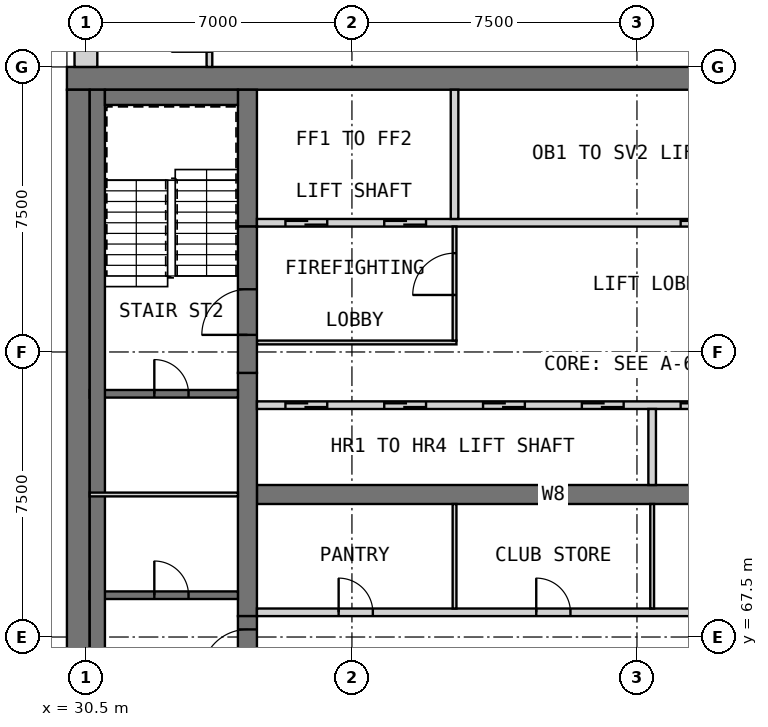
"""IFC4 building model, lengths in metres.
Left out: names, types, materials, properties, quantities, classifications, styles, units other than length and angle.
Written with IfcOpenShell. Run it as: python <this file> out.ifc"""

import sys

from ifc_helpers import new_model, si_unit, direction, frame, frame_2d, origin, place, context, subcontext, project, spatial, rectangle, extrude, element, fill, save


model = new_model("IFC4")
c1 = context("Model", 3, precision=1e-05, world=origin(), true_north=direction((0.0, 1.0)))
c2 = subcontext(c1, "Body", "Model", "MODEL_VIEW")
j1 = project(units=[si_unit("LENGTHUNIT", "METRE"), si_unit("PLANEANGLEUNIT", "RADIAN")], contexts=[c1])
p1 = place(None, origin())
s1 = spatial("IfcSite", under=j1, at=p1, CompositionType="ELEMENT")
p2 = place(p1, origin())
s2 = spatial("IfcBuilding", under=s1, at=p2, CompositionType="ELEMENT")
p3 = place(p2, frame((0.0, 0.0, 273.2)))
s3 = spatial("IfcBuildingStorey", under=s2, at=p3, CompositionType="ELEMENT", Elevation=273.2)
p4 = place(p3, frame((30.0, 82.2, 0.0), z_axis=(0.0, 0.0, 1.0), x_axis=(1.0, 0.0, 0.0)))
e1 = element("IfcWall", 1, at=p4, inside=s3, PredefinedType="SHEAR", context=c2, shape_type="SweptSolid", body=[
    extrude(rectangle(XDim=30.0, YDim=0.6, at=frame_2d((15.0, 0.0))), origin(), (0.0, 0.0, 1.0), 3.5),
])
p5 = place(p3, frame((30.3, 60.6, 0.0), z_axis=(0.0, 0.0, 1.0), x_axis=(0.0, 1.0, 0.0)))
e2 = element("IfcWall", 2, at=p5, inside=s3, PredefinedType="SHEAR", context=c2, shape_type="SweptSolid", body=[
    extrude(rectangle(XDim=21.3, YDim=0.6, at=frame_2d((10.65, 0.0))), origin(), (0.0, 0.0, 1.0), 3.5),
])
p6 = place(p3, frame((35.0, 71.25, 0.0), z_axis=(0.0, 0.0, 1.0), x_axis=(1.0, 0.0, 0.0)))
e3 = element("IfcWall", 3, at=p6, inside=s3, PredefinedType="SHEAR", context=c2, shape_type="SweptSolid", body=[
    extrude(rectangle(XDim=15.6, YDim=0.5, at=frame_2d((7.8, 0.0))), origin(), (0.0, 0.0, 1.0), 3.5),
])
p7 = place(p3, frame((34.75, 68.05, 0.0), z_axis=(0.0, 0.0, 1.0), x_axis=(0.0, 1.0, 0.0)))
e4 = element("IfcWall", 4, at=p7, inside=s3, PredefinedType="SHEAR", context=c2, shape_type="SweptSolid", body=[
    extrude(rectangle(XDim=6.4, YDim=0.5, at=frame_2d((3.2, 0.0))), origin(), (0.0, 0.0, 1.0), 3.5),
])
p8 = place(p3, frame((34.75, 78.3, 0.0), z_axis=(0.0, 0.0, 1.0), x_axis=(0.0, 1.0, 0.0)))
e5 = element("IfcWall", 5, at=p8, inside=s3, PredefinedType="SHEAR", context=c2, shape_type="SweptSolid", body=[
    extrude(rectangle(XDim=3.6, YDim=0.5, at=frame_2d((1.8, 0.0))), origin(), (0.0, 0.0, 1.0), 3.5),
])
p9 = place(p2, frame((0.0, 0.0, 34.0)))
s4 = spatial("IfcBuildingStorey", under=s2, at=p9, CompositionType="ELEMENT", Elevation=34.0)
for number, where, z_axis, x_axis in (
    (6, (29.7, 70.8, 0.0), (0.0, 0.0, 1.0), (0.0, 1.0, 0.0)),
    (7, (29.7, 75.675, 0.0), (0.0, 0.0, 1.0), (0.0, 1.0, 0.0)),
    (8, (29.7, 80.55, 0.0), (0.0, 0.0, 1.0), (0.0, 1.0, 0.0)),
):
    element("IfcWall", number, at=place(p9, frame(where, z_axis=z_axis, x_axis=x_axis)), inside=s4, PredefinedType="SOLIDWALL", context=c2, shape_type="SweptSolid", body=[
        extrude(rectangle(XDim=0.9, YDim=0.6, at=frame_2d((0.45, 0.0))), origin(), (0.0, 0.0, 1.0), 286.2),
    ])
p10 = place(p3, frame((30.5, 89.5, 0.0), z_axis=(0.0, 0.0, 1.0), x_axis=(0.0, -1.0, 0.0)))
e9 = element("IfcWall", 9, at=p10, inside=s3, PredefinedType="SOLIDWALL", context=c2, shape_type="SweptSolid", body=[
    extrude(rectangle(XDim=7.0, YDim=0.6, at=frame_2d((3.5, 0.0))), origin(), (0.0, 0.0, 1.0), 3.25),
])
p11 = place(p10, frame((3.925, 0.0, 0.8)))
e10 = element("IfcOpeningElement", 10, at=p11, cuts=e9, PredefinedType="OPENING", context=c2, shape_type="SweptSolid", body=[
    extrude(rectangle(XDim=2.4, YDim=1.8, at=frame_2d((1.2, 0.9))), frame((0.0, 0.31, 0.0), z_axis=(0.0, -1.0, 0.0), x_axis=(1.0, 0.0, 0.0)), (0.0, 0.0, 1.0), 0.62),
])
p12 = place(p10, frame((0.425, 0.0, 0.8)))
e11 = element("IfcOpeningElement", 11, at=p12, cuts=e9, PredefinedType="OPENING", context=c2, shape_type="SweptSolid", body=[
    extrude(rectangle(XDim=2.4, YDim=1.8, at=frame_2d((1.2, 0.9))), frame((0.0, 0.31, 0.0), z_axis=(0.0, -1.0, 0.0), x_axis=(1.0, 0.0, 0.0)), (0.0, 0.0, 1.0), 0.62),
])
p13 = place(p3, frame((35.0, 68.15, 0.0), z_axis=(0.0, 0.0, 1.0), x_axis=(1.0, 0.0, 0.0)))
e12 = element("IfcWall", 12, at=p13, inside=s3, PredefinedType="PARTITIONING", context=c2, shape_type="SweptSolid", body=[
    extrude(rectangle(XDim=15.6, YDim=0.2, at=frame_2d((7.8, 0.0))), origin(), (0.0, 0.0, 1.0), 3.25),
])
p14 = place(p13, frame((2.15, 0.0, 0.0)))
e13 = element("IfcOpeningElement", 13, at=p14, cuts=e12, PredefinedType="OPENING", context=c2, shape_type="SweptSolid", body=[
    extrude(rectangle(XDim=0.9, YDim=2.1, at=frame_2d((0.45, 1.05))), frame((0.0, 0.11, 0.0), z_axis=(0.0, -1.0, 0.0), x_axis=(1.0, 0.0, 0.0)), (0.0, 0.0, 1.0), 0.22),
])
p15 = place(p13, frame((7.35, 0.0, 0.0)))
e14 = element("IfcOpeningElement", 14, at=p15, cuts=e12, PredefinedType="OPENING", context=c2, shape_type="SweptSolid", body=[
    extrude(rectangle(XDim=0.9, YDim=2.1, at=frame_2d((0.45, 1.05))), frame((0.0, 0.11, 0.0), z_axis=(0.0, -1.0, 0.0), x_axis=(1.0, 0.0, 0.0)), (0.0, 0.0, 1.0), 0.22),
])
p16 = place(p13, frame((12.55, 0.0, 0.0)))
e15 = element("IfcOpeningElement", 15, at=p16, cuts=e12, PredefinedType="OPENING", context=c2, shape_type="SweptSolid", body=[
    extrude(rectangle(XDim=0.9, YDim=2.1, at=frame_2d((0.45, 1.05))), frame((0.0, 0.11, 0.0), z_axis=(0.0, -1.0, 0.0), x_axis=(1.0, 0.0, 0.0)), (0.0, 0.0, 1.0), 0.22),
])
for number, where, z_axis, x_axis in (
    (16, (40.2, 68.25, 0.0), (0.0, 0.0, 1.0), (0.0, 1.0, 0.0)),
    (17, (45.4, 68.25, 0.0), (0.0, 0.0, 1.0), (0.0, 1.0, 0.0)),
):
    element("IfcWall", number, at=place(p3, frame(where, z_axis=z_axis, x_axis=x_axis)), inside=s3, PredefinedType="PARTITIONING", context=c2, shape_type="SweptSolid", body=[
        extrude(rectangle(XDim=2.75, YDim=0.1, at=frame_2d((1.375, 0.0))), origin(), (0.0, 0.0, 1.0), 3.25),
    ])
p17 = place(p3, frame((35.0, 73.6, 0.0), z_axis=(0.0, 0.0, 1.0), x_axis=(1.0, 0.0, 0.0)))
e18 = element("IfcWall", 18, at=p17, inside=s3, PredefinedType="SOLIDWALL", context=c2, shape_type="SweptSolid", body=[
    extrude(rectangle(XDim=15.6, YDim=0.2, at=frame_2d((7.8, 0.0))), origin(), (0.0, 0.0, 1.0), 3.5),
])
p18 = place(p17, frame((0.75, 0.0, 0.0)))
e19 = element("IfcOpeningElement", 19, at=p18, cuts=e18, PredefinedType="OPENING", context=c2, shape_type="SweptSolid", body=[
    extrude(rectangle(XDim=1.1, YDim=2.1, at=frame_2d((0.55, 1.05))), frame((0.0, 0.11, 0.0), z_axis=(0.0, -1.0, 0.0), x_axis=(1.0, 0.0, 0.0)), (0.0, 0.0, 1.0), 0.22),
])
p19 = place(p17, frame((3.35, 0.0, 0.0)))
e20 = element("IfcOpeningElement", 20, at=p19, cuts=e18, PredefinedType="OPENING", context=c2, shape_type="SweptSolid", body=[
    extrude(rectangle(XDim=1.1, YDim=2.1, at=frame_2d((0.55, 1.05))), frame((0.0, 0.11, 0.0), z_axis=(0.0, -1.0, 0.0), x_axis=(1.0, 0.0, 0.0)), (0.0, 0.0, 1.0), 0.22),
])
p20 = place(p17, frame((5.95, 0.0, 0.0)))
e21 = element("IfcOpeningElement", 21, at=p20, cuts=e18, PredefinedType="OPENING", context=c2, shape_type="SweptSolid", body=[
    extrude(rectangle(XDim=1.1, YDim=2.1, at=frame_2d((0.55, 1.05))), frame((0.0, 0.11, 0.0), z_axis=(0.0, -1.0, 0.0), x_axis=(1.0, 0.0, 0.0)), (0.0, 0.0, 1.0), 0.22),
])
p21 = place(p17, frame((8.55, 0.0, 0.0)))
e22 = element("IfcOpeningElement", 22, at=p21, cuts=e18, PredefinedType="OPENING", context=c2, shape_type="SweptSolid", body=[
    extrude(rectangle(XDim=1.1, YDim=2.1, at=frame_2d((0.55, 1.05))), frame((0.0, 0.11, 0.0), z_axis=(0.0, -1.0, 0.0), x_axis=(1.0, 0.0, 0.0)), (0.0, 0.0, 1.0), 0.22),
])
p22 = place(p17, frame((11.15, 0.0, 0.0)))
e23 = element("IfcOpeningElement", 23, at=p22, cuts=e18, PredefinedType="OPENING", context=c2, shape_type="SweptSolid", body=[
    extrude(rectangle(XDim=1.1, YDim=2.1, at=frame_2d((0.55, 1.05))), frame((0.0, 0.11, 0.0), z_axis=(0.0, -1.0, 0.0), x_axis=(1.0, 0.0, 0.0)), (0.0, 0.0, 1.0), 0.22),
])
p23 = place(p17, frame((13.75, 0.0, 0.0)))
e24 = element("IfcOpeningElement", 24, at=p23, cuts=e18, PredefinedType="OPENING", context=c2, shape_type="SweptSolid", body=[
    extrude(rectangle(XDim=1.1, YDim=2.1, at=frame_2d((0.55, 1.05))), frame((0.0, 0.11, 0.0), z_axis=(0.0, -1.0, 0.0), x_axis=(1.0, 0.0, 0.0)), (0.0, 0.0, 1.0), 0.22),
])
p24 = place(p3, frame((45.4, 71.5, 0.0), z_axis=(0.0, 0.0, 1.0), x_axis=(0.0, 1.0, 0.0)))
e25 = element("IfcWall", 25, at=p24, inside=s3, PredefinedType="SOLIDWALL", context=c2, shape_type="SweptSolid", body=[
    extrude(rectangle(XDim=2.0, YDim=0.2, at=frame_2d((1.0, 0.0))), origin(), (0.0, 0.0, 1.0), 3.5),
])
p25 = place(p3, frame((35.0, 78.4, 0.0), z_axis=(0.0, 0.0, 1.0), x_axis=(1.0, 0.0, 0.0)))
e26 = element("IfcWall", 26, at=p25, inside=s3, PredefinedType="SOLIDWALL", context=c2, shape_type="SweptSolid", body=[
    extrude(rectangle(XDim=15.6, YDim=0.2, at=frame_2d((7.8, 0.0))), origin(), (0.0, 0.0, 1.0), 3.5),
])
p26 = place(p25, frame((0.75, 0.0, 0.0)))
e27 = element("IfcOpeningElement", 27, at=p26, cuts=e26, PredefinedType="OPENING", context=c2, shape_type="SweptSolid", body=[
    extrude(rectangle(XDim=1.1, YDim=2.1, at=frame_2d((0.55, 1.05))), frame((0.0, 0.11, 0.0), z_axis=(0.0, -1.0, 0.0), x_axis=(1.0, 0.0, 0.0)), (0.0, 0.0, 1.0), 0.22),
])
p27 = place(p25, frame((3.35, 0.0, 0.0)))
e28 = element("IfcOpeningElement", 28, at=p27, cuts=e26, PredefinedType="OPENING", context=c2, shape_type="SweptSolid", body=[
    extrude(rectangle(XDim=1.1, YDim=2.1, at=frame_2d((0.55, 1.05))), frame((0.0, 0.11, 0.0), z_axis=(0.0, -1.0, 0.0), x_axis=(1.0, 0.0, 0.0)), (0.0, 0.0, 1.0), 0.22),
])
p28 = place(p25, frame((11.15, 0.0, 0.0)))
e29 = element("IfcOpeningElement", 29, at=p28, cuts=e26, PredefinedType="OPENING", context=c2, shape_type="SweptSolid", body=[
    extrude(rectangle(XDim=1.1, YDim=2.1, at=frame_2d((0.55, 1.05))), frame((0.0, 0.11, 0.0), z_axis=(0.0, -1.0, 0.0), x_axis=(1.0, 0.0, 0.0)), (0.0, 0.0, 1.0), 0.22),
])
p29 = place(p25, frame((13.75, 0.0, 0.0)))
e30 = element("IfcOpeningElement", 30, at=p29, cuts=e26, PredefinedType="OPENING", context=c2, shape_type="SweptSolid", body=[
    extrude(rectangle(XDim=1.1, YDim=2.1, at=frame_2d((0.55, 1.05))), frame((0.0, 0.11, 0.0), z_axis=(0.0, -1.0, 0.0), x_axis=(1.0, 0.0, 0.0)), (0.0, 0.0, 1.0), 0.22),
])
p30 = place(p3, frame((40.2, 78.5, 0.0), z_axis=(0.0, 0.0, 1.0), x_axis=(0.0, 1.0, 0.0)))
e31 = element("IfcWall", 31, at=p30, inside=s3, PredefinedType="SOLIDWALL", context=c2, shape_type="SweptSolid", body=[
    extrude(rectangle(XDim=3.4, YDim=0.2, at=frame_2d((1.7, 0.0))), origin(), (0.0, 0.0, 1.0), 3.5),
])
p31 = place(p3, frame((35.0, 75.25, 0.0), z_axis=(0.0, 0.0, 1.0), x_axis=(1.0, 0.0, 0.0)))
e32 = element("IfcWall", 32, at=p31, inside=s3, PredefinedType="PARTITIONING", context=c2, shape_type="SweptSolid", body=[
    extrude(rectangle(XDim=5.25, YDim=0.1, at=frame_2d((2.625, 0.0))), origin(), (0.0, 0.0, 1.0), 3.25),
])
p32 = place(p3, frame((40.2, 75.3, 0.0), z_axis=(0.0, 0.0, 1.0), x_axis=(0.0, 1.0, 0.0)))
e33 = element("IfcWall", 33, at=p32, inside=s3, PredefinedType="PARTITIONING", context=c2, shape_type="SweptSolid", body=[
    extrude(rectangle(XDim=3.0, YDim=0.1, at=frame_2d((1.5, 0.0))), origin(), (0.0, 0.0, 1.0), 3.25),
])
p33 = place(p32, frame((1.2, 0.0, 0.0)))
e34 = element("IfcOpeningElement", 34, at=p33, cuts=e33, PredefinedType="OPENING", context=c2, shape_type="SweptSolid", body=[
    extrude(rectangle(XDim=1.1, YDim=2.1, at=frame_2d((0.55, 1.05))), frame((0.0, 0.06, 0.0), z_axis=(0.0, -1.0, 0.0), x_axis=(1.0, 0.0, 0.0)), (0.0, 0.0, 1.0), 0.12),
])
p34 = place(p3, frame((34.75, 64.2, 0.0), z_axis=(0.0, 0.0, 1.0), x_axis=(0.0, 1.0, 0.0)))
e35 = element("IfcWall", 35, at=p34, inside=s3, PredefinedType="SOLIDWALL", context=c2, shape_type="SweptSolid", body=[
    extrude(rectangle(XDim=3.85, YDim=0.5, at=frame_2d((1.925, 0.0))), origin(), (0.0, 0.0, 1.0), 2.3),
])
p35 = place(p34, frame((2.3, 0.0, 0.0)))
e36 = element("IfcOpeningElement", 36, at=p35, cuts=e35, PredefinedType="OPENING", context=c2, shape_type="SweptSolid", body=[
    extrude(rectangle(XDim=1.2, YDim=2.1, at=frame_2d((0.6, 1.05))), frame((0.0, 0.26, 0.0), z_axis=(0.0, -1.0, 0.0), x_axis=(1.0, 0.0, 0.0)), (0.0, 0.0, 1.0), 0.52),
])
p36 = place(p3, frame((34.75, 74.45, 0.0), z_axis=(0.0, 0.0, 1.0), x_axis=(0.0, 1.0, 0.0)))
e37 = element("IfcWall", 37, at=p36, inside=s3, PredefinedType="SOLIDWALL", context=c2, shape_type="SweptSolid", body=[
    extrude(rectangle(XDim=3.85, YDim=0.5, at=frame_2d((1.925, 0.0))), origin(), (0.0, 0.0, 1.0), 2.3),
])
p37 = place(p36, frame((1.0, 0.0, 0.0)))
e38 = element("IfcOpeningElement", 38, at=p37, cuts=e37, PredefinedType="OPENING", context=c2, shape_type="SweptSolid", body=[
    extrude(rectangle(XDim=1.2, YDim=2.1, at=frame_2d((0.6, 1.05))), frame((0.0, 0.26, 0.0), z_axis=(0.0, -1.0, 0.0), x_axis=(1.0, 0.0, 0.0)), (0.0, 0.0, 1.0), 0.52),
])
p38 = place(p3, frame((30.6, 68.6, 0.0), z_axis=(0.0, 0.0, 1.0), x_axis=(1.0, 0.0, 0.0)))
e39 = element("IfcWall", 39, at=p38, inside=s3, PredefinedType="SOLIDWALL", context=c2, shape_type="SweptSolid", body=[
    extrude(rectangle(XDim=3.9, YDim=0.2, at=frame_2d((1.95, 0.0))), origin(), (0.0, 0.0, 1.0), 3.25),
])
p39 = place(p38, frame((1.7, 0.0, 0.0)))
e40 = element("IfcOpeningElement", 40, at=p39, cuts=e39, PredefinedType="OPENING", context=c2, shape_type="SweptSolid", body=[
    extrude(rectangle(XDim=0.9, YDim=2.1, at=frame_2d((0.45, 1.05))), frame((0.0, 0.11, 0.0), z_axis=(0.0, -1.0, 0.0), x_axis=(1.0, 0.0, 0.0)), (0.0, 0.0, 1.0), 0.22),
])
p40 = place(p3, frame((30.6, 73.9, 0.0), z_axis=(0.0, 0.0, 1.0), x_axis=(1.0, 0.0, 0.0)))
e41 = element("IfcWall", 41, at=p40, inside=s3, PredefinedType="SOLIDWALL", context=c2, shape_type="SweptSolid", body=[
    extrude(rectangle(XDim=3.9, YDim=0.2, at=frame_2d((1.95, 0.0))), origin(), (0.0, 0.0, 1.0), 3.25),
])
p41 = place(p40, frame((1.7, 0.0, 0.0)))
e42 = element("IfcOpeningElement", 42, at=p41, cuts=e41, PredefinedType="OPENING", context=c2, shape_type="SweptSolid", body=[
    extrude(rectangle(XDim=0.9, YDim=2.1, at=frame_2d((0.45, 1.05))), frame((0.0, 0.11, 0.0), z_axis=(0.0, -1.0, 0.0), x_axis=(1.0, 0.0, 0.0)), (0.0, 0.0, 1.0), 0.22),
])
p42 = place(p3, frame((30.8, 60.6, 0.0), z_axis=(0.0, 0.0, 1.0), x_axis=(0.0, 1.0, 0.0)))
e43 = element("IfcWall", 43, at=p42, inside=s3, PredefinedType="SOLIDWALL", context=c2, shape_type="SweptSolid", body=[
    extrude(rectangle(XDim=21.3, YDim=0.4, at=frame_2d((10.65, 0.0))), origin(), (0.0, 0.0, 1.0), 3.25),
])
p43 = place(p3, frame((31.0, 81.7, 0.0), z_axis=(0.0, 0.0, 1.0), x_axis=(1.0, 0.0, 0.0)))
e44 = element("IfcWall", 44, at=p43, inside=s3, PredefinedType="SOLIDWALL", context=c2, shape_type="SweptSolid", body=[
    extrude(rectangle(XDim=3.5, YDim=0.4, at=frame_2d((1.75, 0.0))), origin(), (0.0, 0.0, 1.0), 3.25),
])
p44 = place(p3, frame((30.6, 71.25, 0.0), z_axis=(0.0, 0.0, 1.0), x_axis=(1.0, 0.0, 0.0)))
e45 = element("IfcWall", 45, at=p44, inside=s3, PredefinedType="PARTITIONING", context=c2, shape_type="SweptSolid", body=[
    extrude(rectangle(XDim=3.9, YDim=0.1, at=frame_2d((1.95, 0.0))), origin(), (0.0, 0.0, 1.0), 3.25),
])
p45 = place(p3, frame((33.75, 82.5, 0.0), z_axis=(0.0, 0.0, 1.0), x_axis=(0.0, 1.0, 0.0)))
e46 = element("IfcWall", 46, at=p45, inside=s3, PredefinedType="PARTITIONING", context=c2, shape_type="SweptSolid", body=[
    extrude(rectangle(XDim=1.725, YDim=0.15, at=frame_2d((0.863, 0.0))), origin(), (0.0, 0.0, 1.0), 3.25),
])
p46 = place(p45, frame((0.4, 0.0, 0.0)))
e47 = element("IfcOpeningElement", 47, at=p46, cuts=e46, PredefinedType="OPENING", context=c2, shape_type="SweptSolid", body=[
    extrude(rectangle(XDim=1.0, YDim=2.1, at=frame_2d((0.5, 1.05))), frame((0.0, 0.085, 0.0), z_axis=(0.0, -1.0, 0.0), x_axis=(1.0, 0.0, 0.0)), (0.0, 0.0, 1.0), 0.17),
])
p47 = place(p14, origin())
e48 = element("IfcDoor", 48, at=p47, inside=s3, OperationType="SINGLE_SWING_RIGHT", PredefinedType="DOOR", context=c2, shape_type="SweptSolid", body=[
    extrude(rectangle(XDim=0.9, YDim=2.1, at=frame_2d((0.45, 1.05))), frame((0.0, 0.025, 0.0), z_axis=(0.0, -1.0, 0.0), x_axis=(1.0, 0.0, 0.0)), (0.0, 0.0, 1.0), 0.05),
])
fill(e13, e48)
p48 = place(p15, origin())
e49 = element("IfcDoor", 49, at=p48, inside=s3, OperationType="SINGLE_SWING_LEFT", PredefinedType="DOOR", context=c2, shape_type="SweptSolid", body=[
    extrude(rectangle(XDim=0.9, YDim=2.1, at=frame_2d((0.45, 1.05))), frame((0.0, 0.025, 0.0), z_axis=(0.0, -1.0, 0.0), x_axis=(1.0, 0.0, 0.0)), (0.0, 0.0, 1.0), 0.05),
])
fill(e14, e49)
p49 = place(p18, origin())
e50 = element("IfcDoor", 50, at=p49, inside=s3, OperationType="DOUBLE_DOOR_SLIDING", PredefinedType="DOOR", context=c2, shape_type="SweptSolid", body=[
    extrude(rectangle(XDim=1.1, YDim=2.1, at=frame_2d((0.55, 1.05))), frame((0.0, 0.025, 0.0), z_axis=(0.0, -1.0, 0.0), x_axis=(1.0, 0.0, 0.0)), (0.0, 0.0, 1.0), 0.05),
])
fill(e19, e50)
p50 = place(p19, origin())
e51 = element("IfcDoor", 51, at=p50, inside=s3, OperationType="DOUBLE_DOOR_SLIDING", PredefinedType="DOOR", context=c2, shape_type="SweptSolid", body=[
    extrude(rectangle(XDim=1.1, YDim=2.1, at=frame_2d((0.55, 1.05))), frame((0.0, 0.025, 0.0), z_axis=(0.0, -1.0, 0.0), x_axis=(1.0, 0.0, 0.0)), (0.0, 0.0, 1.0), 0.05),
])
fill(e20, e51)
p51 = place(p20, origin())
e52 = element("IfcDoor", 52, at=p51, inside=s3, OperationType="DOUBLE_DOOR_SLIDING", PredefinedType="DOOR", context=c2, shape_type="SweptSolid", body=[
    extrude(rectangle(XDim=1.1, YDim=2.1, at=frame_2d((0.55, 1.05))), frame((0.0, 0.025, 0.0), z_axis=(0.0, -1.0, 0.0), x_axis=(1.0, 0.0, 0.0)), (0.0, 0.0, 1.0), 0.05),
])
fill(e21, e52)
p52 = place(p21, origin())
e53 = element("IfcDoor", 53, at=p52, inside=s3, OperationType="DOUBLE_DOOR_SLIDING", PredefinedType="DOOR", context=c2, shape_type="SweptSolid", body=[
    extrude(rectangle(XDim=1.1, YDim=2.1, at=frame_2d((0.55, 1.05))), frame((0.0, 0.025, 0.0), z_axis=(0.0, -1.0, 0.0), x_axis=(1.0, 0.0, 0.0)), (0.0, 0.0, 1.0), 0.05),
])
fill(e22, e53)
p53 = place(p22, origin())
e54 = element("IfcDoor", 54, at=p53, inside=s3, OperationType="DOUBLE_DOOR_SLIDING", PredefinedType="DOOR", context=c2, shape_type="SweptSolid", body=[
    extrude(rectangle(XDim=1.1, YDim=2.1, at=frame_2d((0.55, 1.05))), frame((0.0, 0.025, 0.0), z_axis=(0.0, -1.0, 0.0), x_axis=(1.0, 0.0, 0.0)), (0.0, 0.0, 1.0), 0.05),
])
fill(e23, e54)
p54 = place(p26, origin())
e55 = element("IfcDoor", 55, at=p54, inside=s3, OperationType="DOUBLE_DOOR_SLIDING", PredefinedType="DOOR", context=c2, shape_type="SweptSolid", body=[
    extrude(rectangle(XDim=1.1, YDim=2.1, at=frame_2d((0.55, 1.05))), frame((0.0, 0.025, 0.0), z_axis=(0.0, -1.0, 0.0), x_axis=(1.0, 0.0, 0.0)), (0.0, 0.0, 1.0), 0.05),
])
fill(e27, e55)
p55 = place(p27, origin())
e56 = element("IfcDoor", 56, at=p55, inside=s3, OperationType="DOUBLE_DOOR_SLIDING", PredefinedType="DOOR", context=c2, shape_type="SweptSolid", body=[
    extrude(rectangle(XDim=1.1, YDim=2.1, at=frame_2d((0.55, 1.05))), frame((0.0, 0.025, 0.0), z_axis=(0.0, -1.0, 0.0), x_axis=(1.0, 0.0, 0.0)), (0.0, 0.0, 1.0), 0.05),
])
fill(e28, e56)
p56 = place(p28, origin())
e57 = element("IfcDoor", 57, at=p56, inside=s3, OperationType="DOUBLE_DOOR_SLIDING", PredefinedType="DOOR", context=c2, shape_type="SweptSolid", body=[
    extrude(rectangle(XDim=1.1, YDim=2.1, at=frame_2d((0.55, 1.05))), frame((0.0, 0.025, 0.0), z_axis=(0.0, -1.0, 0.0), x_axis=(1.0, 0.0, 0.0)), (0.0, 0.0, 1.0), 0.05),
])
fill(e29, e57)
p57 = place(p33, origin())
e58 = element("IfcDoor", 58, at=p57, inside=s3, OperationType="SINGLE_SWING_LEFT", PredefinedType="DOOR", context=c2, shape_type="SweptSolid", body=[
    extrude(rectangle(XDim=1.1, YDim=2.1, at=frame_2d((0.55, 1.05))), frame((0.0, 0.025, 0.0), z_axis=(0.0, -1.0, 0.0), x_axis=(1.0, 0.0, 0.0)), (0.0, 0.0, 1.0), 0.05),
])
fill(e34, e58)
p58 = place(p35, origin())
e59 = element("IfcDoor", 59, at=p58, inside=s3, OperationType="SINGLE_SWING_LEFT", PredefinedType="DOOR", context=c2, shape_type="SweptSolid", body=[
    extrude(rectangle(XDim=1.2, YDim=2.1, at=frame_2d((0.6, 1.05))), frame((0.0, 0.025, 0.0), z_axis=(0.0, -1.0, 0.0), x_axis=(1.0, 0.0, 0.0)), (0.0, 0.0, 1.0), 0.05),
])
fill(e36, e59)
p59 = place(p37, origin())
e60 = element("IfcDoor", 60, at=p59, inside=s3, OperationType="SINGLE_SWING_RIGHT", PredefinedType="DOOR", context=c2, shape_type="SweptSolid", body=[
    extrude(rectangle(XDim=1.2, YDim=2.1, at=frame_2d((0.6, 1.05))), frame((0.0, 0.025, 0.0), z_axis=(0.0, -1.0, 0.0), x_axis=(1.0, 0.0, 0.0)), (0.0, 0.0, 1.0), 0.05),
])
fill(e38, e60)
p60 = place(p39, origin())
e61 = element("IfcDoor", 61, at=p60, inside=s3, OperationType="SINGLE_SWING_LEFT", PredefinedType="DOOR", context=c2, shape_type="SweptSolid", body=[
    extrude(rectangle(XDim=0.9, YDim=2.1, at=frame_2d((0.45, 1.05))), frame((0.0, 0.025, 0.0), z_axis=(0.0, -1.0, 0.0), x_axis=(1.0, 0.0, 0.0)), (0.0, 0.0, 1.0), 0.05),
])
fill(e40, e61)
p61 = place(p41, origin())
e62 = element("IfcDoor", 62, at=p61, inside=s3, OperationType="SINGLE_SWING_RIGHT", PredefinedType="DOOR", context=c2, shape_type="SweptSolid", body=[
    extrude(rectangle(XDim=0.9, YDim=2.1, at=frame_2d((0.45, 1.05))), frame((0.0, 0.025, 0.0), z_axis=(0.0, -1.0, 0.0), x_axis=(1.0, 0.0, 0.0)), (0.0, 0.0, 1.0), 0.05),
])
fill(e42, e62)
save(model, sys.argv[1])
